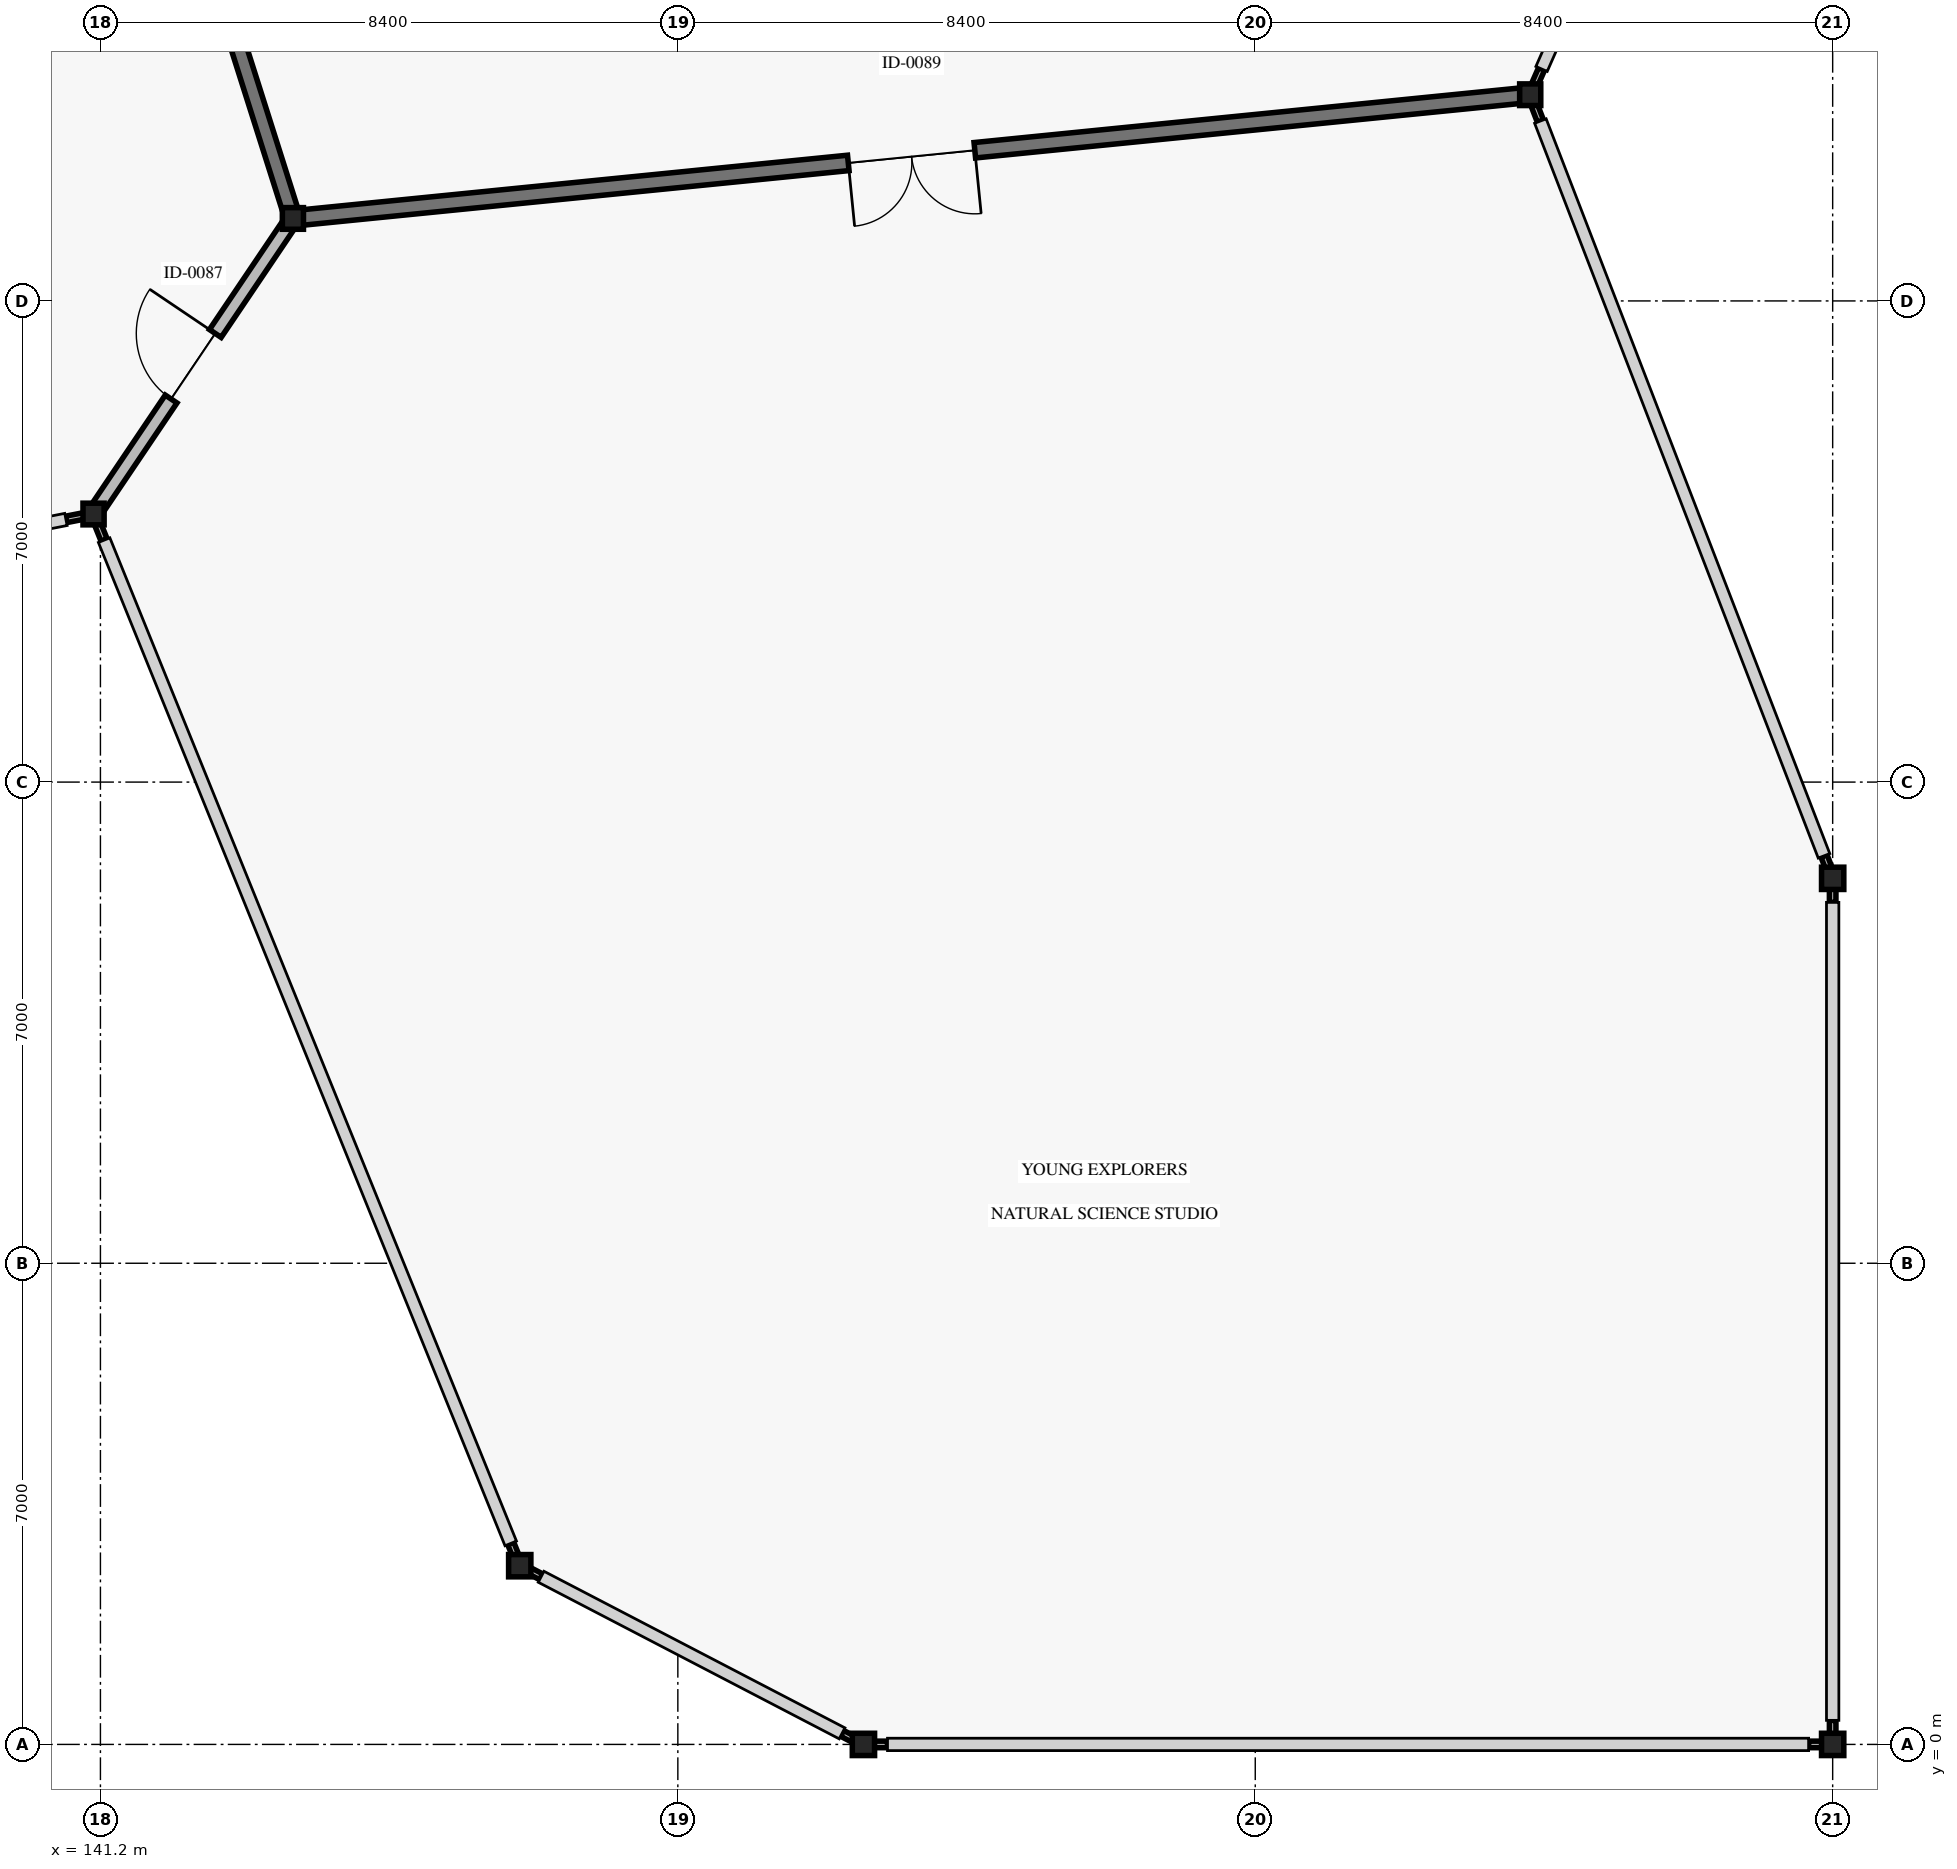
"""IFC4 building model, lengths in metres.
Left out: names, types, materials, properties, quantities, classifications, styles, units other than length and angle.
Written with IfcOpenShell. Run it as: python <this file> out.ifc"""

import sys

from ifc_helpers import new_model, si_unit, direction, frame, frame_2d, origin, origin_2d, place, context, subcontext, project, spatial, rectangle, hollow_circle, i_section, extrude, element, fill, save


model = new_model("IFC4")
c1 = context("Model", 3, precision=1e-05, world=origin(), true_north=direction((0.0, 1.0)))
c2 = subcontext(c1, "Body", "Model", "MODEL_VIEW")
j1 = project(units=[si_unit("LENGTHUNIT", "METRE"), si_unit("PLANEANGLEUNIT", "RADIAN")], contexts=[c1])
p1 = place(None, origin())
s1 = spatial("IfcSite", under=j1, at=p1, CompositionType="ELEMENT")
p2 = place(p1, origin())
s2 = spatial("IfcBuilding", under=s1, at=p2, CompositionType="ELEMENT")
p3 = place(p2, frame((0.0, 0.0, 5.4)))
s3 = spatial("IfcBuildingStorey", under=s2, at=p3, CompositionType="ELEMENT", Elevation=5.4)
for number, where, z_axis, x_axis in (
    (1, (141.1, 17.9, 0.0), (0.0, 0.0, 1.0), (1.0, 0.0, 0.0)),
    (2, (144.0, 22.2, 0.0), (0.0, 0.0, 1.0), (1.0, 0.0, 0.0)),
):
    element("IfcColumn", number, at=place(p3, frame(where, z_axis=z_axis, x_axis=x_axis)), inside=s3, PredefinedType="COLUMN", context=c2, shape_type="SweptSolid", body=[
        extrude(i_section(OverallWidth=0.307, OverallDepth=0.315, WebThickness=0.012, FlangeThickness=0.019, FilletRadius=0.017, at=origin_2d()), origin(), (0.0, 0.0, 1.0), 4.8),
    ])
for number, where, z_axis, x_axis in (
    (3, (147.3, 2.6, 0.0), (0.0, 0.0, 1.0), (1.0, 0.0, 0.0)),
    (4, (152.3, 0.0, 0.0), (0.0, 0.0, 1.0), (1.0, 0.0, 0.0)),
):
    element("IfcColumn", number, at=place(p3, frame(where, z_axis=z_axis, x_axis=x_axis)), inside=s3, PredefinedType="COLUMN", context=c2, shape_type="SweptSolid", body=[
        extrude(hollow_circle(Radius=0.162, WallThickness=0.01, at=origin_2d()), origin(), (0.0, 0.0, 1.0), 4.8),
    ])
p4 = place(p3, frame((162.0, 24.0, 0.0), z_axis=(0.0, 0.0, 1.0), x_axis=(1.0, 0.0, 0.0)))
e5 = element("IfcColumn", 5, at=p4, inside=s3, PredefinedType="COLUMN", context=c2, shape_type="SweptSolid", body=[
    extrude(i_section(OverallWidth=0.307, OverallDepth=0.315, WebThickness=0.012, FlangeThickness=0.019, FilletRadius=0.017, at=origin_2d()), origin(), (0.0, 0.0, 1.0), 4.8),
])
for number, where, z_axis, x_axis in (
    (6, (166.4, 0.0, 0.0), (0.0, 0.0, 1.0), (1.0, 0.0, 0.0)),
    (7, (166.4, 12.6, 0.0), (0.0, 0.0, 1.0), (1.0, 0.0, 0.0)),
):
    element("IfcColumn", number, at=place(p3, frame(where, z_axis=z_axis, x_axis=x_axis)), inside=s3, PredefinedType="COLUMN", context=c2, shape_type="SweptSolid", body=[
        extrude(hollow_circle(Radius=0.162, WallThickness=0.01, at=origin_2d()), origin(), (0.0, 0.0, 1.0), 4.8),
    ])
p5 = place(p3, frame((141.0, 17.88, 0.0), z_axis=(0.0, 0.0, 1.0), x_axis=(-0.981545118721, -0.19123069815, 0.0)))
e8 = element("IfcWall", 8, at=p5, inside=s3, PredefinedType="SOLIDWALL", context=c2, shape_type="SweptSolid", body=[
    extrude(rectangle(XDim=0.308, YDim=0.095, at=frame_2d((0.154, 0.0))), origin(), (0.0, 0.0, 1.0), 3.62),
])
p6 = place(p3, frame((147.284, 2.639, 0.0), z_axis=(0.0, 0.0, 1.0), x_axis=(-0.373990367235, 0.927432587963, 0.0)))
e9 = element("IfcWall", 9, at=p6, inside=s3, PredefinedType="SOLIDWALL", context=c2, shape_type="SweptSolid", body=[
    extrude(rectangle(XDim=0.307, YDim=0.095, at=frame_2d((0.154, 0.0))), origin(), (0.0, 0.0, 1.0), 3.62),
])
p7 = place(p3, frame((141.254, 17.52, 0.0), z_axis=(0.0, 0.0, 1.0), x_axis=(-0.374265965306, 0.927321404484, 0.0)))
e10 = element("IfcWall", 10, at=p7, inside=s3, PredefinedType="SOLIDWALL", context=c2, shape_type="SweptSolid", body=[
    extrude(rectangle(XDim=0.307, YDim=0.095, at=frame_2d((0.154, 0.0))), origin(), (0.0, 0.0, 1.0), 3.62),
])
p8 = place(p3, frame((152.263, 0.019, 0.0), z_axis=(0.0, 0.0, 1.0), x_axis=(-0.888005951379, 0.45983195878, 0.0)))
e11 = element("IfcWall", 11, at=p8, inside=s3, PredefinedType="SOLIDWALL", context=c2, shape_type="SweptSolid", body=[
    extrude(rectangle(XDim=0.309, YDim=0.095, at=frame_2d((0.154, 0.0))), origin(), (0.0, 0.0, 1.0), 3.62),
])
p9 = place(p3, frame((147.611, 2.439, 0.0), z_axis=(0.0, 0.0, 1.0), x_axis=(-0.887850239649, 0.460132537378, 0.0)))
e12 = element("IfcWall", 12, at=p9, inside=s3, PredefinedType="SOLIDWALL", context=c2, shape_type="SweptSolid", body=[
    extrude(rectangle(XDim=0.309, YDim=0.095, at=frame_2d((0.154, 0.0))), origin(), (0.0, 0.0, 1.0), 3.62),
])
for number, where, z_axis, x_axis in (
    (13, (166.358, 0.0, 0.0), (0.0, 0.0, 1.0), (-1.0, 0.0, 0.0)),
    (14, (152.65, 0.0, 0.0), (0.0, 0.0, 1.0), (-1.0, 0.0, 0.0)),
):
    element("IfcWall", number, at=place(p3, frame(where, z_axis=z_axis, x_axis=x_axis)), inside=s3, PredefinedType="SOLIDWALL", context=c2, shape_type="SweptSolid", body=[
        extrude(rectangle(XDim=0.308, YDim=0.095, at=frame_2d((0.154, 0.0))), origin(), (0.0, 0.0, 1.0), 3.62),
    ])
for number, where, z_axis, x_axis in (
    (15, (166.4, 12.558, 0.0), (0.0, 0.0, 1.0), (0.0, -1.0, 0.0)),
    (16, (166.4, 0.35, 0.0), (0.0, 0.0, 1.0), (0.0, -1.0, 0.0)),
):
    element("IfcWall", number, at=place(p3, frame(where, z_axis=z_axis, x_axis=x_axis)), inside=s3, PredefinedType="SOLIDWALL", context=c2, shape_type="SweptSolid", body=[
        extrude(rectangle(XDim=0.308, YDim=0.095, at=frame_2d((0.154, 0.0))), origin(), (0.0, 0.0, 1.0), 3.62),
    ])
p10 = place(p3, frame((162.037, 23.905, 0.0), z_axis=(0.0, 0.0, 1.0), x_axis=(0.359085078765, -0.933304830271, 0.0)))
e17 = element("IfcWall", 17, at=p10, inside=s3, PredefinedType="SOLIDWALL", context=c2, shape_type="SweptSolid", body=[
    extrude(rectangle(XDim=0.309, YDim=0.095, at=frame_2d((0.154, 0.0))), origin(), (0.0, 0.0, 1.0), 3.62),
])
p11 = place(p3, frame((166.274, 12.927, 0.0), z_axis=(0.0, 0.0, 1.0), x_axis=(0.359773736497, -0.933039580365, 0.0)))
e18 = element("IfcWall", 18, at=p11, inside=s3, PredefinedType="SOLIDWALL", context=c2, shape_type="SweptSolid", body=[
    extrude(rectangle(XDim=0.309, YDim=0.095, at=frame_2d((0.154, 0.0))), origin(), (0.0, 0.0, 1.0), 3.62),
])
p12 = place(p3, frame((162.165, 24.375, 0.0), z_axis=(0.0, 0.0, 1.0), x_axis=(-0.402605813257, -0.915373453369, 0.0)))
e19 = element("IfcWall", 19, at=p12, inside=s3, PredefinedType="SOLIDWALL", context=c2, shape_type="SweptSolid", body=[
    extrude(rectangle(XDim=0.308, YDim=0.095, at=frame_2d((0.154, 0.0))), origin(), (0.0, 0.0, 1.0), 3.62),
])
p13 = place(p3, frame((141.1, 17.9, 0.0), z_axis=(0.0, 0.0, 1.0), x_axis=(0.559124361662, 0.829083800467, 0.0)))
e20 = element("IfcWall", 20, at=p13, inside=s3, PredefinedType="SOLIDWALL", context=c2, shape_type="SweptSolid", body=[
    extrude(rectangle(XDim=5.187, YDim=0.205, at=frame_2d((2.593, 0.0))), origin(), (0.0, 0.0, 1.0), 3.32),
])
p14 = place(p13, frame((2.018, 0.0, 0.0)))
e21 = element("IfcOpeningElement", 21, at=p14, cuts=e20, PredefinedType="OPENING", context=c2, shape_type="SweptSolid", body=[
    extrude(rectangle(XDim=1.15, YDim=2.2, at=frame_2d((0.575, 1.1))), frame((0.0, 0.113, 0.0), z_axis=(0.0, -1.0, 0.0), x_axis=(1.0, 0.0, 0.0)), (0.0, 0.0, 1.0), 0.225),
])
p15 = place(p3, frame((144.0, 22.2, 0.0), z_axis=(0.0, 0.0, 1.0), x_axis=(-0.302243860734, 0.953230637699, 0.0)))
e22 = element("IfcWall", 22, at=p15, inside=s3, PredefinedType="SOLIDWALL", context=c2, shape_type="SweptSolid", body=[
    extrude(rectangle(XDim=21.506, YDim=0.225, at=frame_2d((10.753, 0.0))), origin(), (0.0, 0.0, 1.0), 4.02),
])
p16 = place(p15, frame((12.679, 0.0, 0.0)))
e23 = element("IfcOpeningElement", 23, at=p16, cuts=e22, PredefinedType="OPENING", context=c2, shape_type="SweptSolid", body=[
    extrude(rectangle(XDim=2.0, YDim=2.5, at=frame_2d((1.0, 1.25))), frame((0.0, 0.123, 0.0), z_axis=(0.0, -1.0, 0.0), x_axis=(1.0, 0.0, 0.0)), (0.0, 0.0, 1.0), 0.245),
])
p17 = place(p3, frame((162.0, 24.0, 0.0), z_axis=(0.0, 0.0, 1.0), x_axis=(-0.995036922958, -0.099506391506, 0.0)))
e24 = element("IfcWall", 24, at=p17, inside=s3, PredefinedType="SOLIDWALL", context=c2, shape_type="SweptSolid", body=[
    extrude(rectangle(XDim=18.09, YDim=0.225, at=frame_2d((9.045, 0.0))), origin(), (0.0, 0.0, 1.0), 4.02),
])
p18 = place(p17, frame((8.12, 0.0, 0.0)))
e25 = element("IfcOpeningElement", 25, at=p18, cuts=e24, PredefinedType="OPENING", context=c2, shape_type="SweptSolid", body=[
    extrude(rectangle(XDim=1.85, YDim=2.4, at=frame_2d((0.925, 1.2))), frame((0.0, 0.123, 0.0), z_axis=(0.0, -1.0, 0.0), x_axis=(1.0, 0.0, 0.0)), (0.0, 0.0, 1.0), 0.245),
])
p19 = place(p14, origin())
e26 = element("IfcDoor", 26, at=p19, inside=s3, OperationType="SINGLE_SWING_RIGHT", PredefinedType="DOOR", context=c2, shape_type="SweptSolid", body=[
    extrude(rectangle(XDim=1.15, YDim=2.2, at=frame_2d((0.575, 1.1))), frame((0.0, 0.025, 0.0), z_axis=(0.0, -1.0, 0.0), x_axis=(1.0, 0.0, 0.0)), (0.0, 0.0, 1.0), 0.05),
])
fill(e21, e26)
p20 = place(p18, origin())
e27 = element("IfcDoor", 27, at=p20, inside=s3, OperationType="DOUBLE_DOOR_SINGLE_SWING", PredefinedType="DOOR", context=c2, shape_type="SweptSolid", body=[
    extrude(rectangle(XDim=1.85, YDim=2.4, at=frame_2d((0.925, 1.2))), frame((0.0, 0.025, 0.0), z_axis=(0.0, -1.0, 0.0), x_axis=(1.0, 0.0, 0.0)), (0.0, 0.0, 1.0), 0.05),
])
fill(e25, e27)
save(model, sys.argv[1])
